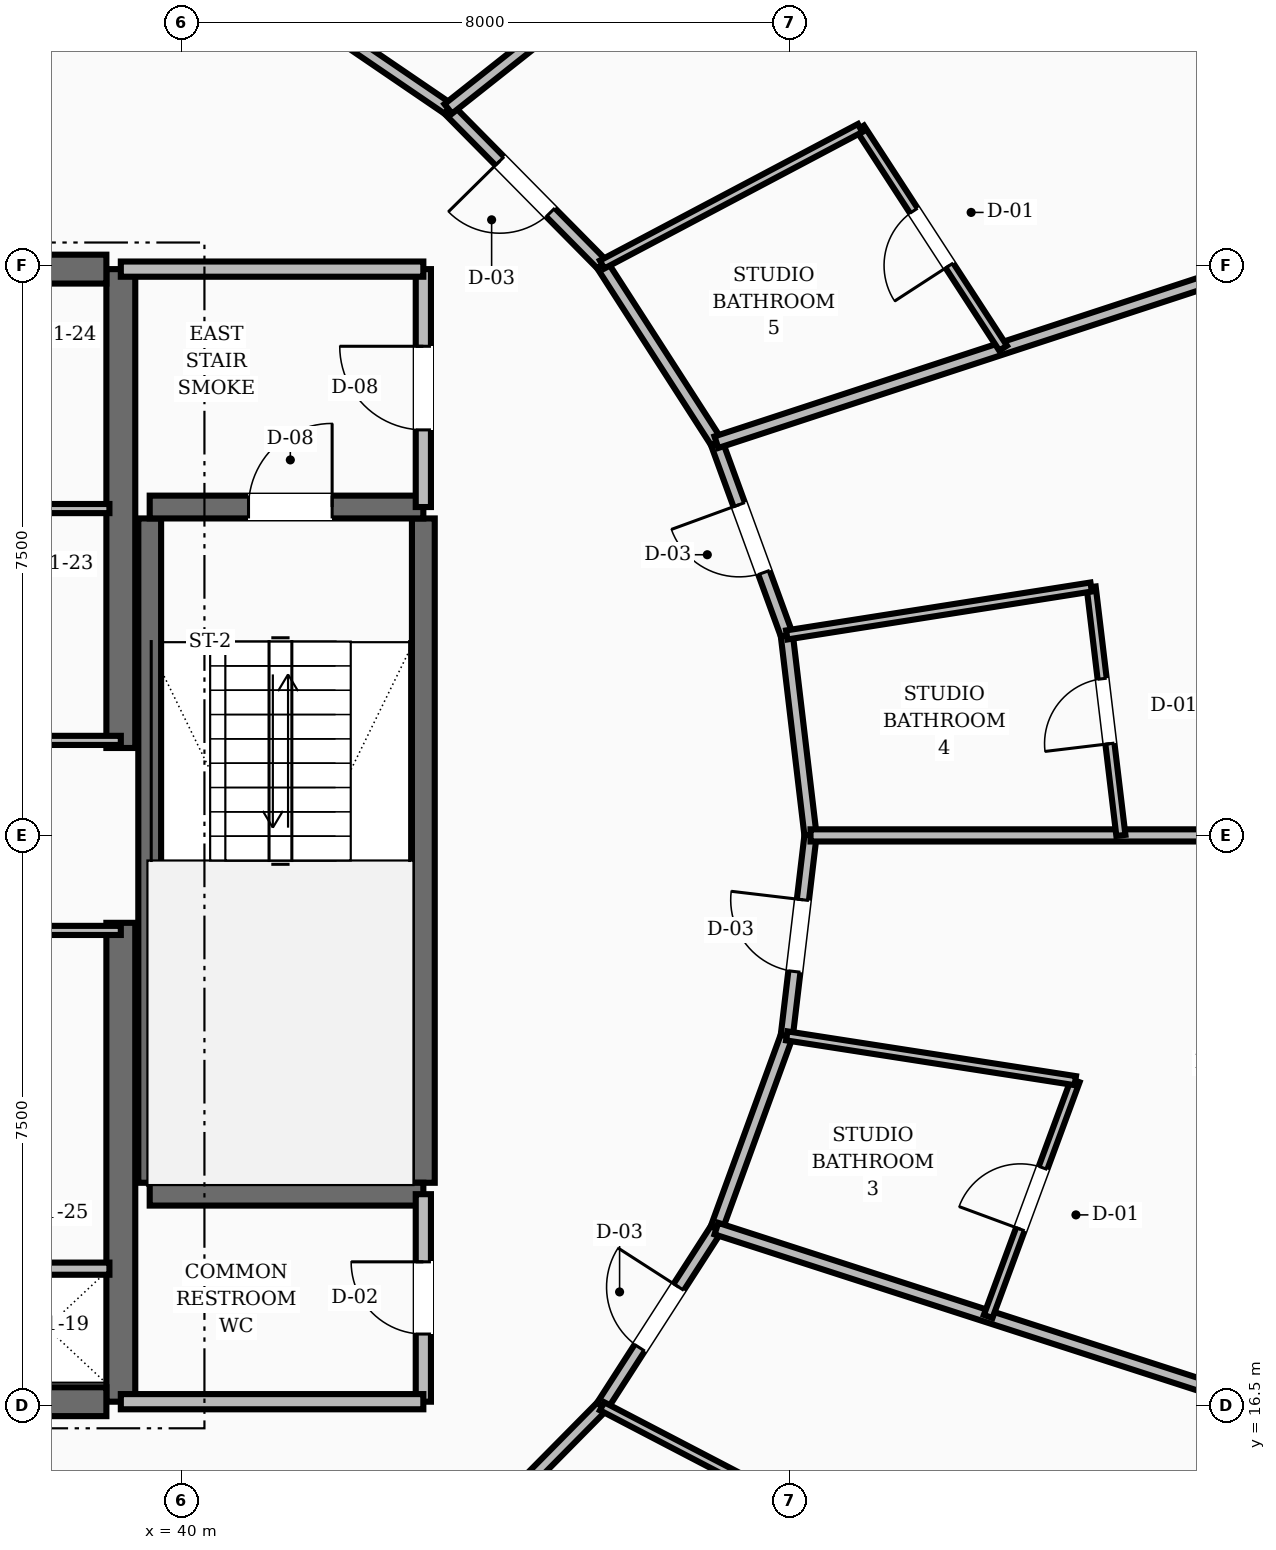
"""IFC4 building model, lengths in metres.
Left out: names, types, materials, properties, quantities, classifications, styles, units other than length and angle.
Written with IfcOpenShell. Run it as: python <this file> out.ifc"""

import sys

from ifc_helpers import new_model, si_unit, direction, frame, frame_2d, origin, place, context, subcontext, project, spatial, rectangle, extrude, element, fill, save


model = new_model("IFC4")
c1 = context("Model", 3, precision=1e-05, world=origin(), true_north=direction((0.0, 1.0)))
c2 = subcontext(c1, "Body", "Model", "MODEL_VIEW")
j1 = project(units=[si_unit("LENGTHUNIT", "METRE"), si_unit("PLANEANGLEUNIT", "RADIAN")], contexts=[c1])
p1 = place(None, origin())
s1 = spatial("IfcSite", under=j1, at=p1, CompositionType="ELEMENT")
p2 = place(p1, origin())
s2 = spatial("IfcBuilding", under=s1, at=p2, CompositionType="ELEMENT")
p3 = place(p2, frame((0.0, 0.0, 84.4)))
s3 = spatial("IfcBuildingStorey", under=s2, at=p3, CompositionType="ELEMENT", Elevation=84.4)
for number, where, z_axis, x_axis in (
    (1, (39.2, 16.55, 0.0), (0.0, 0.0, 1.0), (0.0, 1.0, 0.0)),
    (2, (39.2, 25.15, 0.0), (0.0, 0.0, 1.0), (0.0, 1.0, 0.0)),
):
    element("IfcWall", number, at=place(p3, frame(where, z_axis=z_axis, x_axis=x_axis)), inside=s3, PredefinedType="SHEAR", context=c2, shape_type="SweptSolid", body=[
        extrude(rectangle(XDim=6.3, YDim=0.38, at=frame_2d((3.15, 0.0))), origin(), (0.0, 0.0, 1.0), 3.6),
    ])
p4 = place(p3, frame((35.8, 16.55, 0.0), z_axis=(0.0, 0.0, 1.0), x_axis=(1.0, 0.0, 0.0)))
e3 = element("IfcWall", 3, at=p4, inside=s3, PredefinedType="SHEAR", context=c2, shape_type="SweptSolid", body=[
    extrude(rectangle(XDim=3.21, YDim=0.38, at=frame_2d((1.605, 0.0))), origin(), (0.0, 0.0, 1.0), 3.6),
])
p5 = place(p4, frame((0.3, 0.0, 0.0)))
e4 = element("IfcOpeningElement", 4, at=p5, cuts=e3, PredefinedType="OPENING", context=c2, shape_type="SweptSolid", body=[
    extrude(rectangle(XDim=1.1, YDim=2.1, at=frame_2d((0.55, 1.05))), frame((0.0, 0.2, 0.0), z_axis=(0.0, -1.0, 0.0), x_axis=(1.0, 0.0, 0.0)), (0.0, 0.0, 1.0), 0.4),
])
p6 = place(p3, frame((35.8, 31.45, 0.0), z_axis=(0.0, 0.0, 1.0), x_axis=(1.0, 0.0, 0.0)))
e5 = element("IfcWall", 5, at=p6, inside=s3, PredefinedType="SHEAR", context=c2, shape_type="SweptSolid", body=[
    extrude(rectangle(XDim=3.21, YDim=0.38, at=frame_2d((1.605, 0.0))), origin(), (0.0, 0.0, 1.0), 3.6),
])
p7 = place(p6, frame((0.3, 0.0, 0.0)))
e6 = element("IfcOpeningElement", 6, at=p7, cuts=e5, PredefinedType="OPENING", context=c2, shape_type="SweptSolid", body=[
    extrude(rectangle(XDim=1.1, YDim=2.1, at=frame_2d((0.55, 1.05))), frame((0.0, 0.2, 0.0), z_axis=(0.0, -1.0, 0.0), x_axis=(1.0, 0.0, 0.0)), (0.0, 0.0, 1.0), 0.4),
])
for number, where, z_axis, x_axis in (
    (7, (43.18, 19.43, 0.0), (0.0, 0.0, 1.0), (0.0, 1.0, 0.0)),
    (8, (39.58, 19.43, 0.0), (0.0, 0.0, 1.0), (0.0, 1.0, 0.0)),
):
    element("IfcWall", number, at=place(p3, frame(where, z_axis=z_axis, x_axis=x_axis)), inside=s3, PredefinedType="SHEAR", context=c2, shape_type="SweptSolid", body=[
        extrude(rectangle(XDim=8.74, YDim=0.3, at=frame_2d((4.37, 0.0))), origin(), (0.0, 0.0, 1.0), 3.6),
    ])
p8 = place(p3, frame((39.58, 19.28, 0.0), z_axis=(0.0, 0.0, 1.0), x_axis=(1.0, 0.0, 0.0)))
e9 = element("IfcWall", 9, at=p8, inside=s3, PredefinedType="SHEAR", context=c2, shape_type="SweptSolid", body=[
    extrude(rectangle(XDim=3.6, YDim=0.3, at=frame_2d((1.8, 0.0))), origin(), (0.0, 0.0, 1.0), 3.6),
])
p9 = place(p3, frame((39.58, 28.32, 0.0), z_axis=(0.0, 0.0, 1.0), x_axis=(1.0, 0.0, 0.0)))
e10 = element("IfcWall", 10, at=p9, inside=s3, PredefinedType="SHEAR", context=c2, shape_type="SweptSolid", body=[
    extrude(rectangle(XDim=3.6, YDim=0.3, at=frame_2d((1.8, 0.0))), origin(), (0.0, 0.0, 1.0), 3.6),
])
p10 = place(p9, frame((1.3, 0.0, 0.0)))
e11 = element("IfcOpeningElement", 11, at=p10, cuts=e10, PredefinedType="OPENING", context=c2, shape_type="SweptSolid", body=[
    extrude(rectangle(XDim=1.1, YDim=2.1, at=frame_2d((0.55, 1.05))), frame((0.0, 0.16, 0.0), z_axis=(0.0, -1.0, 0.0), x_axis=(1.0, 0.0, 0.0)), (0.0, 0.0, 1.0), 0.32),
])
p11 = place(p3, frame((43.18, 28.32, 0.0), z_axis=(0.0, 0.0, 1.0), x_axis=(0.0, 1.0, 0.0)))
e12 = element("IfcWall", 12, at=p11, inside=s3, PredefinedType="SOLIDWALL", context=c2, shape_type="SweptSolid", body=[
    extrude(rectangle(XDim=3.13, YDim=0.2, at=frame_2d((1.565, 0.0))), origin(), (0.0, 0.0, 1.0), 2.71),
])
p12 = place(p11, frame((1.015, 0.0, 0.0)))
e13 = element("IfcOpeningElement", 13, at=p12, cuts=e12, PredefinedType="OPENING", context=c2, shape_type="SweptSolid", body=[
    extrude(rectangle(XDim=1.1, YDim=2.1, at=frame_2d((0.55, 1.05))), frame((0.0, 0.11, 0.0), z_axis=(0.0, -1.0, 0.0), x_axis=(1.0, 0.0, 0.0)), (0.0, 0.0, 1.0), 0.22),
])
p13 = place(p3, frame((39.2, 31.45, 0.0), z_axis=(0.0, 0.0, 1.0), x_axis=(1.0, 0.0, 0.0)))
e14 = element("IfcWall", 14, at=p13, inside=s3, PredefinedType="SOLIDWALL", context=c2, shape_type="SweptSolid", body=[
    extrude(rectangle(XDim=3.98, YDim=0.2, at=frame_2d((1.99, 0.0))), origin(), (0.0, 0.0, 1.0), 2.71),
])
p14 = place(p3, frame((43.18, 16.55, 0.0), z_axis=(0.0, 0.0, 1.0), x_axis=(0.0, 1.0, 0.0)))
e15 = element("IfcWall", 15, at=p14, inside=s3, PredefinedType="SOLIDWALL", context=c2, shape_type="SweptSolid", body=[
    extrude(rectangle(XDim=2.73, YDim=0.2, at=frame_2d((1.365, 0.0))), origin(), (0.0, 0.0, 1.0), 2.71),
])
p15 = place(p14, frame((0.89, 0.0, 0.0)))
e16 = element("IfcOpeningElement", 16, at=p15, cuts=e15, PredefinedType="OPENING", context=c2, shape_type="SweptSolid", body=[
    extrude(rectangle(XDim=0.95, YDim=2.1, at=frame_2d((0.475, 1.05))), frame((0.0, 0.11, 0.0), z_axis=(0.0, -1.0, 0.0), x_axis=(1.0, 0.0, 0.0)), (0.0, 0.0, 1.0), 0.22),
])
p16 = place(p3, frame((39.2, 16.55, 0.0), z_axis=(0.0, 0.0, 1.0), x_axis=(1.0, 0.0, 0.0)))
e17 = element("IfcWall", 17, at=p16, inside=s3, PredefinedType="SOLIDWALL", context=c2, shape_type="SweptSolid", body=[
    extrude(rectangle(XDim=3.98, YDim=0.2, at=frame_2d((1.99, 0.0))), origin(), (0.0, 0.0, 1.0), 2.71),
])
p17 = place(p3, frame((37.4, 18.3, 0.0), z_axis=(0.0, 0.0, 1.0), x_axis=(1.0, 0.0, 0.0)))
e18 = element("IfcWall", 18, at=p17, inside=s3, PredefinedType="SOLIDWALL", context=c2, shape_type="SweptSolid", body=[
    extrude(rectangle(XDim=1.65, YDim=0.16, at=frame_2d((0.825, 0.0))), origin(), (0.0, 0.0, 1.0), 2.71),
])
for number, where, z_axis, x_axis in (
    (19, (37.4, 25.25, 0.0), (0.0, 0.0, 1.0), (1.0, 0.0, 0.0)),
    (20, (37.4, 22.75, 0.0), (0.0, 0.0, 1.0), (1.0, 0.0, 0.0)),
):
    element("IfcWall", number, at=place(p3, frame(where, z_axis=z_axis, x_axis=x_axis)), inside=s3, PredefinedType="PARTITIONING", context=c2, shape_type="SweptSolid", body=[
        extrude(rectangle(XDim=1.8, YDim=0.12, at=frame_2d((0.9, 0.0))), origin(), (0.0, 0.0, 1.0), 2.71),
    ])
p18 = place(p3, frame((37.4, 28.3, 0.0), z_axis=(0.0, 0.0, 1.0), x_axis=(1.0, 0.0, 0.0)))
e21 = element("IfcWall", 21, at=p18, inside=s3, PredefinedType="PARTITIONING", context=c2, shape_type="SweptSolid", body=[
    extrude(rectangle(XDim=1.65, YDim=0.12, at=frame_2d((0.825, 0.0))), origin(), (0.0, 0.0, 1.0), 2.71),
])
p19 = place(p3, frame((48.274, 24.0, 0.0), z_axis=(0.0, 0.0, 1.0), x_axis=(-0.117763961213, 0.99304161516, 0.0)))
e22 = element("IfcWall", 22, at=p19, inside=s3, PredefinedType="SOLIDWALL", context=c2, shape_type="SweptSolid", body=[
    extrude(rectangle(XDim=2.656, YDim=0.16, at=frame_2d((1.328, 0.0))), origin(), (0.0, 0.0, 1.0), 2.71),
])
p20 = place(p3, frame((47.961, 26.637, 0.0), z_axis=(0.0, 0.0, 1.0), x_axis=(-0.343013437329, 0.939330496583, 0.0)))
e23 = element("IfcWall", 23, at=p20, inside=s3, PredefinedType="SOLIDWALL", context=c2, shape_type="SweptSolid", body=[
    extrude(rectangle(XDim=2.7, YDim=0.16, at=frame_2d((1.35, 0.0))), origin(), (0.0, 0.0, 1.0), 2.71),
])
p21 = place(p20, frame((0.875, 0.0, 0.0)))
e24 = element("IfcOpeningElement", 24, at=p21, cuts=e23, PredefinedType="OPENING", context=c2, shape_type="SweptSolid", body=[
    extrude(rectangle(XDim=0.95, YDim=2.1, at=frame_2d((0.475, 1.05))), frame((0.0, 0.09, 0.0), z_axis=(0.0, -1.0, 0.0), x_axis=(1.0, 0.0, 0.0)), (0.0, 0.0, 1.0), 0.18),
])
p22 = place(p3, frame((47.035, 29.173, 0.0), z_axis=(0.0, 0.0, 1.0), x_axis=(-0.541126045017, 0.840941498206, 0.0)))
e25 = element("IfcWall", 25, at=p22, inside=s3, PredefinedType="SOLIDWALL", context=c2, shape_type="SweptSolid", body=[
    extrude(rectangle(XDim=2.779, YDim=0.16, at=frame_2d((1.39, 0.0))), origin(), (0.0, 0.0, 1.0), 2.71),
])
p23 = place(p3, frame((45.531, 31.51, 0.0), z_axis=(0.0, 0.0, 1.0), x_axis=(-0.702811997, 0.711375636969, 0.0)))
e26 = element("IfcWall", 26, at=p23, inside=s3, PredefinedType="SOLIDWALL", context=c2, shape_type="SweptSolid", body=[
    extrude(rectangle(XDim=2.879, YDim=0.16, at=frame_2d((1.44, 0.0))), origin(), (0.0, 0.0, 1.0), 2.71),
])
p24 = place(p23, frame((0.965, 0.0, 0.0)))
e27 = element("IfcOpeningElement", 27, at=p24, cuts=e26, PredefinedType="OPENING", context=c2, shape_type="SweptSolid", body=[
    extrude(rectangle(XDim=0.95, YDim=2.1, at=frame_2d((0.475, 1.05))), frame((0.0, 0.09, 0.0), z_axis=(0.0, -1.0, 0.0), x_axis=(1.0, 0.0, 0.0)), (0.0, 0.0, 1.0), 0.18),
])
p25 = place(p3, frame((43.508, 33.559, 0.0), z_axis=(0.0, 0.0, 1.0), x_axis=(-0.826293096206, 0.56324037423, 0.0)))
e28 = element("IfcWall", 28, at=p25, inside=s3, PredefinedType="SOLIDWALL", context=c2, shape_type="SweptSolid", body=[
    extrude(rectangle(XDim=2.985, YDim=0.16, at=frame_2d((1.492, 0.0))), origin(), (0.0, 0.0, 1.0), 2.71),
])
p26 = place(p3, frame((43.508, 14.441, 0.0), z_axis=(0.0, 0.0, 1.0), x_axis=(0.702811997, 0.711375636969, 0.0)))
e29 = element("IfcWall", 29, at=p26, inside=s3, PredefinedType="SOLIDWALL", context=c2, shape_type="SweptSolid", body=[
    extrude(rectangle(XDim=2.879, YDim=0.16, at=frame_2d((1.44, 0.0))), origin(), (0.0, 0.0, 1.0), 2.71),
])
p27 = place(p3, frame((45.531, 16.49, 0.0), z_axis=(0.0, 0.0, 1.0), x_axis=(0.541126045017, 0.840941498206, 0.0)))
e30 = element("IfcWall", 30, at=p27, inside=s3, PredefinedType="SOLIDWALL", context=c2, shape_type="SweptSolid", body=[
    extrude(rectangle(XDim=2.779, YDim=0.16, at=frame_2d((1.39, 0.0))), origin(), (0.0, 0.0, 1.0), 2.71),
])
p28 = place(p27, frame((0.915, 0.0, 0.0)))
e31 = element("IfcOpeningElement", 31, at=p28, cuts=e30, PredefinedType="OPENING", context=c2, shape_type="SweptSolid", body=[
    extrude(rectangle(XDim=0.95, YDim=2.1, at=frame_2d((0.475, 1.05))), frame((0.0, 0.09, 0.0), z_axis=(0.0, -1.0, 0.0), x_axis=(1.0, 0.0, 0.0)), (0.0, 0.0, 1.0), 0.18),
])
p29 = place(p3, frame((47.035, 18.827, 0.0), z_axis=(0.0, 0.0, 1.0), x_axis=(0.343013437329, 0.939330496583, 0.0)))
e32 = element("IfcWall", 32, at=p29, inside=s3, PredefinedType="SOLIDWALL", context=c2, shape_type="SweptSolid", body=[
    extrude(rectangle(XDim=2.7, YDim=0.16, at=frame_2d((1.35, 0.0))), origin(), (0.0, 0.0, 1.0), 2.71),
])
p30 = place(p3, frame((47.961, 21.363, 0.0), z_axis=(0.0, 0.0, 1.0), x_axis=(0.117763961213, 0.99304161516, 0.0)))
e33 = element("IfcWall", 33, at=p30, inside=s3, PredefinedType="SOLIDWALL", context=c2, shape_type="SweptSolid", body=[
    extrude(rectangle(XDim=2.656, YDim=0.16, at=frame_2d((1.328, 0.0))), origin(), (0.0, 0.0, 1.0), 2.71),
])
p31 = place(p30, frame((0.853, 0.0, 0.0)))
e34 = element("IfcOpeningElement", 34, at=p31, cuts=e33, PredefinedType="OPENING", context=c2, shape_type="SweptSolid", body=[
    extrude(rectangle(XDim=0.95, YDim=2.1, at=frame_2d((0.475, 1.05))), frame((0.0, 0.09, 0.0), z_axis=(0.0, -1.0, 0.0), x_axis=(1.0, 0.0, 0.0)), (0.0, 0.0, 1.0), 0.18),
])
p32 = place(p3, frame((45.531, 16.49, 0.0), z_axis=(0.0, 0.0, 1.0), x_axis=(0.886738326297, -0.462271717366, 0.0)))
e35 = element("IfcWall", 35, at=p32, inside=s3, PredefinedType="PARTITIONING", context=c2, shape_type="SweptSolid", body=[
    extrude(rectangle(XDim=3.629, YDim=0.12, at=frame_2d((1.815, 0.0))), origin(), (0.0, 0.0, 1.0), 2.71),
])
p33 = place(p3, frame((47.035, 18.827, 0.0), z_axis=(0.0, 0.0, 1.0), x_axis=(0.951534464328, -0.307542132393, 0.0)))
e36 = element("IfcWall", 36, at=p33, inside=s3, PredefinedType="SOLIDWALL", context=c2, shape_type="SweptSolid", body=[
    extrude(rectangle(XDim=9.839, YDim=0.16, at=frame_2d((4.919, 0.0))), origin(), (0.0, 0.0, 1.0), 2.71),
])
p34 = place(p3, frame((50.611, 17.671, 0.0), z_axis=(0.0, 0.0, 1.0), x_axis=(0.346556958516, 0.938028930526, 0.0)))
e37 = element("IfcWall", 37, at=p34, inside=s3, PredefinedType="PARTITIONING", context=c2, shape_type="SweptSolid", body=[
    extrude(rectangle(XDim=3.308, YDim=0.12, at=frame_2d((1.654, 0.0))), origin(), (0.0, 0.0, 1.0), 2.71),
])
p35 = place(p34, frame((1.224, 0.0, 0.0)))
e38 = element("IfcOpeningElement", 38, at=p35, cuts=e37, PredefinedType="OPENING", context=c2, shape_type="SweptSolid", body=[
    extrude(rectangle(XDim=0.86, YDim=2.1, at=frame_2d((0.43, 1.05))), frame((0.0, 0.07, 0.0), z_axis=(0.0, -1.0, 0.0), x_axis=(1.0, 0.0, 0.0)), (0.0, 0.0, 1.0), 0.14),
])
p36 = place(p3, frame((47.961, 21.363, 0.0), z_axis=(0.0, 0.0, 1.0), x_axis=(0.988170250217, -0.153360870451, 0.0)))
e39 = element("IfcWall", 39, at=p36, inside=s3, PredefinedType="PARTITIONING", context=c2, shape_type="SweptSolid", body=[
    extrude(rectangle(XDim=3.841, YDim=0.12, at=frame_2d((1.921, 0.0))), origin(), (0.0, 0.0, 1.0), 2.71),
])
p37 = place(p3, frame((48.274, 24.0, 0.0), z_axis=(0.0, 0.0, 1.0), x_axis=(1.0, 0.0, 0.0)))
e40 = element("IfcWall", 40, at=p37, inside=s3, PredefinedType="SOLIDWALL", context=c2, shape_type="SweptSolid", body=[
    extrude(rectangle(XDim=10.695, YDim=0.16, at=frame_2d((5.348, 0.0))), origin(), (0.0, 0.0, 1.0), 2.71),
])
p38 = place(p3, frame((52.357, 24.0, 0.0), z_axis=(0.0, 0.0, 1.0), x_axis=(-0.118911209682, 0.992904891826, 0.0)))
e41 = element("IfcWall", 41, at=p38, inside=s3, PredefinedType="PARTITIONING", context=c2, shape_type="SweptSolid", body=[
    extrude(rectangle(XDim=3.291, YDim=0.12, at=frame_2d((1.646, 0.0))), origin(), (0.0, 0.0, 1.0), 2.71),
])
p39 = place(p38, frame((1.216, 0.0, 0.0)))
e42 = element("IfcOpeningElement", 42, at=p39, cuts=e41, PredefinedType="OPENING", context=c2, shape_type="SweptSolid", body=[
    extrude(rectangle(XDim=0.86, YDim=2.1, at=frame_2d((0.43, 1.05))), frame((0.0, 0.07, 0.0), z_axis=(0.0, -1.0, 0.0), x_axis=(1.0, 0.0, 0.0)), (0.0, 0.0, 1.0), 0.14),
])
p40 = place(p3, frame((47.961, 26.637, 0.0), z_axis=(0.0, 0.0, 1.0), x_axis=(0.987827335178, 0.155554350227, 0.0)))
e43 = element("IfcWall", 43, at=p40, inside=s3, PredefinedType="PARTITIONING", context=c2, shape_type="SweptSolid", body=[
    extrude(rectangle(XDim=4.054, YDim=0.12, at=frame_2d((2.027, 0.0))), origin(), (0.0, 0.0, 1.0), 2.71),
])
p41 = place(p3, frame((47.035, 29.173, 0.0), z_axis=(0.0, 0.0, 1.0), x_axis=(0.95020777267, 0.311617054664, 0.0)))
e44 = element("IfcWall", 44, at=p41, inside=s3, PredefinedType="SOLIDWALL", context=c2, shape_type="SweptSolid", body=[
    extrude(rectangle(XDim=10.397, YDim=0.16, at=frame_2d((5.199, 0.0))), origin(), (0.0, 0.0, 1.0), 2.71),
])
p42 = place(p3, frame((50.808, 30.41, 0.0), z_axis=(0.0, 0.0, 1.0), x_axis=(-0.544774633125, 0.838582493917, 0.0)))
e45 = element("IfcWall", 45, at=p42, inside=s3, PredefinedType="PARTITIONING", context=c2, shape_type="SweptSolid", body=[
    extrude(rectangle(XDim=3.453, YDim=0.12, at=frame_2d((1.727, 0.0))), origin(), (0.0, 0.0, 1.0), 2.71),
])
p43 = place(p42, frame((1.297, 0.0, 0.0)))
e46 = element("IfcOpeningElement", 46, at=p43, cuts=e45, PredefinedType="OPENING", context=c2, shape_type="SweptSolid", body=[
    extrude(rectangle(XDim=0.86, YDim=2.1, at=frame_2d((0.43, 1.05))), frame((0.0, 0.07, 0.0), z_axis=(0.0, -1.0, 0.0), x_axis=(1.0, 0.0, 0.0)), (0.0, 0.0, 1.0), 0.14),
])
p44 = place(p3, frame((45.531, 31.51, 0.0), z_axis=(0.0, 0.0, 1.0), x_axis=(0.883945577966, 0.467589793723, 0.0)))
e47 = element("IfcWall", 47, at=p44, inside=s3, PredefinedType="PARTITIONING", context=c2, shape_type="SweptSolid", body=[
    extrude(rectangle(XDim=3.841, YDim=0.12, at=frame_2d((1.92, 0.0))), origin(), (0.0, 0.0, 1.0), 2.71),
])
p45 = place(p3, frame((43.508, 33.559, 0.0), z_axis=(0.0, 0.0, 1.0), x_axis=(0.784008851618, 0.620749644047, 0.0)))
e48 = element("IfcWall", 48, at=p45, inside=s3, PredefinedType="SOLIDWALL", context=c2, shape_type="SweptSolid", body=[
    extrude(rectangle(XDim=9.641, YDim=0.16, at=frame_2d((4.82, 0.0))), origin(), (0.0, 0.0, 1.0), 2.71),
])
p46 = place(p10, origin())
e49 = element("IfcDoor", 49, at=p46, inside=s3, OperationType="SINGLE_SWING_RIGHT", PredefinedType="DOOR", context=c2, shape_type="SweptSolid", body=[
    extrude(rectangle(XDim=1.1, YDim=2.1, at=frame_2d((0.55, 1.05))), frame((0.0, 0.025, 0.0), z_axis=(0.0, -1.0, 0.0), x_axis=(1.0, 0.0, 0.0)), (0.0, 0.0, 1.0), 0.05),
])
fill(e11, e49)
p47 = place(p12, origin())
e50 = element("IfcDoor", 50, at=p47, inside=s3, OperationType="SINGLE_SWING_RIGHT", PredefinedType="DOOR", context=c2, shape_type="SweptSolid", body=[
    extrude(rectangle(XDim=1.1, YDim=2.1, at=frame_2d((0.55, 1.05))), frame((0.0, 0.025, 0.0), z_axis=(0.0, -1.0, 0.0), x_axis=(1.0, 0.0, 0.0)), (0.0, 0.0, 1.0), 0.05),
])
fill(e13, e50)
p48 = place(p15, origin())
e51 = element("IfcDoor", 51, at=p48, inside=s3, OperationType="SINGLE_SWING_RIGHT", PredefinedType="DOOR", context=c2, shape_type="SweptSolid", body=[
    extrude(rectangle(XDim=0.95, YDim=2.1, at=frame_2d((0.475, 1.05))), frame((0.0, 0.025, 0.0), z_axis=(0.0, -1.0, 0.0), x_axis=(1.0, 0.0, 0.0)), (0.0, 0.0, 1.0), 0.05),
])
fill(e16, e51)
p49 = place(p28, origin())
e52 = element("IfcDoor", 52, at=p49, inside=s3, OperationType="SINGLE_SWING_RIGHT", PredefinedType="DOOR", context=c2, shape_type="SweptSolid", body=[
    extrude(rectangle(XDim=0.95, YDim=2.1, at=frame_2d((0.475, 1.05))), frame((0.0, 0.025, 0.0), z_axis=(0.0, -1.0, 0.0), x_axis=(1.0, 0.0, 0.0)), (0.0, 0.0, 1.0), 0.05),
])
fill(e31, e52)
p50 = place(p35, origin())
e53 = element("IfcDoor", 53, at=p50, inside=s3, OperationType="SINGLE_SWING_LEFT", PredefinedType="DOOR", context=c2, shape_type="SweptSolid", body=[
    extrude(rectangle(XDim=0.86, YDim=2.1, at=frame_2d((0.43, 1.05))), frame((0.0, 0.025, 0.0), z_axis=(0.0, -1.0, 0.0), x_axis=(1.0, 0.0, 0.0)), (0.0, 0.0, 1.0), 0.05),
])
fill(e38, e53)
p51 = place(p31, origin())
e54 = element("IfcDoor", 54, at=p51, inside=s3, OperationType="SINGLE_SWING_RIGHT", PredefinedType="DOOR", context=c2, shape_type="SweptSolid", body=[
    extrude(rectangle(XDim=0.95, YDim=2.1, at=frame_2d((0.475, 1.05))), frame((0.0, 0.025, 0.0), z_axis=(0.0, -1.0, 0.0), x_axis=(1.0, 0.0, 0.0)), (0.0, 0.0, 1.0), 0.05),
])
fill(e34, e54)
p52 = place(p39, origin())
e55 = element("IfcDoor", 55, at=p52, inside=s3, OperationType="SINGLE_SWING_LEFT", PredefinedType="DOOR", context=c2, shape_type="SweptSolid", body=[
    extrude(rectangle(XDim=0.86, YDim=2.1, at=frame_2d((0.43, 1.05))), frame((0.0, 0.025, 0.0), z_axis=(0.0, -1.0, 0.0), x_axis=(1.0, 0.0, 0.0)), (0.0, 0.0, 1.0), 0.05),
])
fill(e42, e55)
p53 = place(p21, origin())
e56 = element("IfcDoor", 56, at=p53, inside=s3, OperationType="SINGLE_SWING_RIGHT", PredefinedType="DOOR", context=c2, shape_type="SweptSolid", body=[
    extrude(rectangle(XDim=0.95, YDim=2.1, at=frame_2d((0.475, 1.05))), frame((0.0, 0.025, 0.0), z_axis=(0.0, -1.0, 0.0), x_axis=(1.0, 0.0, 0.0)), (0.0, 0.0, 1.0), 0.05),
])
fill(e24, e56)
p54 = place(p43, origin())
e57 = element("IfcDoor", 57, at=p54, inside=s3, OperationType="SINGLE_SWING_LEFT", PredefinedType="DOOR", context=c2, shape_type="SweptSolid", body=[
    extrude(rectangle(XDim=0.86, YDim=2.1, at=frame_2d((0.43, 1.05))), frame((0.0, 0.025, 0.0), z_axis=(0.0, -1.0, 0.0), x_axis=(1.0, 0.0, 0.0)), (0.0, 0.0, 1.0), 0.05),
])
fill(e46, e57)
p55 = place(p24, origin())
e58 = element("IfcDoor", 58, at=p55, inside=s3, OperationType="SINGLE_SWING_RIGHT", PredefinedType="DOOR", context=c2, shape_type="SweptSolid", body=[
    extrude(rectangle(XDim=0.95, YDim=2.1, at=frame_2d((0.475, 1.05))), frame((0.0, 0.025, 0.0), z_axis=(0.0, -1.0, 0.0), x_axis=(1.0, 0.0, 0.0)), (0.0, 0.0, 1.0), 0.05),
])
fill(e27, e58)
save(model, sys.argv[1])
